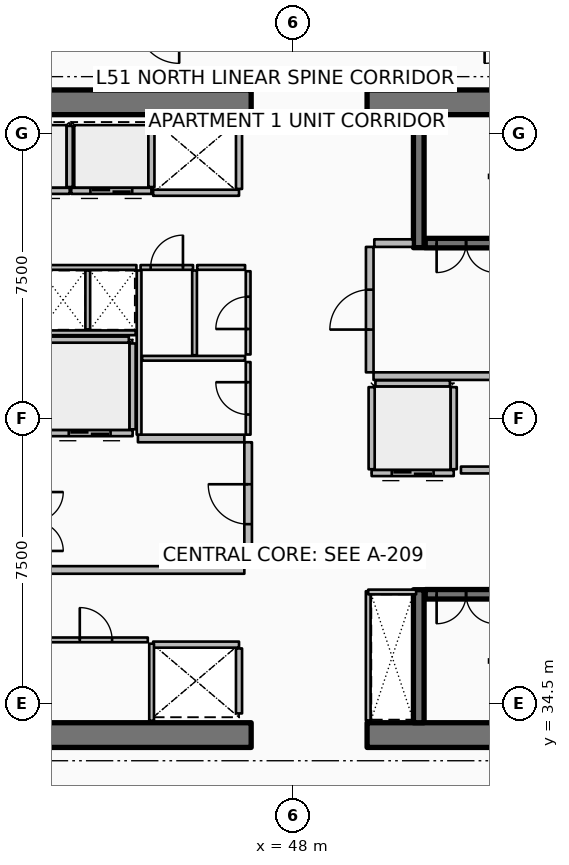
"""IFC4 building model, lengths in metres.
Left out: names, types, materials, properties, quantities, classifications, styles, units other than length and angle.
Written with IfcOpenShell. Run it as: python <this file> out.ifc"""

import sys

from ifc_helpers import new_model, si_unit, direction, frame, frame_2d, origin, place, context, subcontext, project, spatial, rectangle, extrude, element, fill, save


model = new_model("IFC4")
c1 = context("Model", 3, precision=1e-05, world=origin(), true_north=direction((0.0, 1.0)))
c2 = subcontext(c1, "Body", "Model", "MODEL_VIEW")
j1 = project(units=[si_unit("LENGTHUNIT", "METRE"), si_unit("PLANEANGLEUNIT", "RADIAN")], contexts=[c1])
p1 = place(None, origin())
s1 = spatial("IfcSite", under=j1, at=p1, CompositionType="ELEMENT")
p2 = place(p1, origin())
s2 = spatial("IfcBuilding", under=s1, at=p2, CompositionType="ELEMENT")
p3 = place(p2, frame((0.0, 0.0, 202.8)))
s3 = spatial("IfcBuildingStorey", under=s2, at=p3, CompositionType="ELEMENT", Elevation=202.8)
for number, where, z_axis, x_axis in (
    (1, (37.15, 33.675, 0.0), (0.0, 0.0, 1.0), (1.0, 0.0, 0.0)),
    (2, (49.95, 33.675, 0.0), (0.0, 0.0, 1.0), (1.0, 0.0, 0.0)),
    (3, (37.15, 50.325, 0.0), (0.0, 0.0, 1.0), (1.0, 0.0, 0.0)),
    (4, (49.95, 50.325, 0.0), (0.0, 0.0, 1.0), (1.0, 0.0, 0.0)),
):
    element("IfcWall", number, at=place(p3, frame(where, z_axis=z_axis, x_axis=x_axis)), inside=s3, PredefinedType="SHEAR", context=c2, shape_type="SweptSolid", body=[
        extrude(rectangle(XDim=9.75, YDim=0.65, at=frame_2d((4.875, 0.0))), origin(), (0.0, 0.0, 1.0), 3.75),
    ])
for number, where, z_axis, x_axis in (
    (5, (51.31, 46.5, 0.0), (0.0, 0.0, 1.0), (0.0, 1.0, 0.0)),
    (6, (51.31, 34.0, 0.0), (0.0, 0.0, 1.0), (0.0, 1.0, 0.0)),
):
    element("IfcWall", number, at=place(p3, frame(where, z_axis=z_axis, x_axis=x_axis)), inside=s3, PredefinedType="SHEAR", context=c2, shape_type="SweptSolid", body=[
        extrude(rectangle(XDim=3.5, YDim=0.28, at=frame_2d((1.75, 0.0))), origin(), (0.0, 0.0, 1.0), 3.75),
    ])
p4 = place(p3, frame((51.48, 46.62, 0.0), z_axis=(0.0, 0.0, 1.0), x_axis=(1.0, 0.0, 0.0)))
e7 = element("IfcWall", 7, at=p4, inside=s3, PredefinedType="SOLIDWALL", context=c2, shape_type="SweptSolid", body=[
    extrude(rectangle(XDim=7.54, YDim=0.25, at=frame_2d((3.77, 0.0))), origin(), (0.0, 0.0, 1.0), 3.5),
])
p5 = place(p4, frame((0.3, 0.0, 0.0)))
e8 = element("IfcOpeningElement", 8, at=p5, cuts=e7, PredefinedType="OPENING", context=c2, shape_type="SweptSolid", body=[
    extrude(rectangle(XDim=1.55, YDim=2.15, at=frame_2d((0.775, 1.075))), frame((0.0, 0.135, 0.0), z_axis=(0.0, -1.0, 0.0), x_axis=(1.0, 0.0, 0.0)), (0.0, 0.0, 1.0), 0.27),
])
p6 = place(p3, frame((51.48, 37.38, 0.0), z_axis=(0.0, 0.0, 1.0), x_axis=(1.0, 0.0, 0.0)))
e9 = element("IfcWall", 9, at=p6, inside=s3, PredefinedType="SOLIDWALL", context=c2, shape_type="SweptSolid", body=[
    extrude(rectangle(XDim=7.54, YDim=0.25, at=frame_2d((3.77, 0.0))), origin(), (0.0, 0.0, 1.0), 3.5),
])
p7 = place(p6, frame((0.3, 0.0, 0.0)))
e10 = element("IfcOpeningElement", 10, at=p7, cuts=e9, PredefinedType="OPENING", context=c2, shape_type="SweptSolid", body=[
    extrude(rectangle(XDim=1.55, YDim=2.15, at=frame_2d((0.775, 1.075))), frame((0.0, 0.135, 0.0), z_axis=(0.0, -1.0, 0.0), x_axis=(1.0, 0.0, 0.0)), (0.0, 0.0, 1.0), 0.27),
])
p8 = place(p3, frame((42.125, 47.995, 0.0), z_axis=(0.0, 0.0, 1.0), x_axis=(-1.0, 0.0, 0.0)))
e11 = element("IfcWall", 11, at=p8, inside=s3, PredefinedType="PARTITIONING", context=c2, shape_type="SweptSolid", body=[
    extrude(rectangle(XDim=2.11, YDim=0.16, at=frame_2d((1.055, 0.0))), origin(), (0.0, 0.0, 1.0), 3.5),
])
p9 = place(p8, frame((0.505, 0.0, 0.0)))
e12 = element("IfcOpeningElement", 12, at=p9, cuts=e11, PredefinedType="OPENING", context=c2, shape_type="SweptSolid", body=[
    extrude(rectangle(XDim=1.1, YDim=2.1, at=frame_2d((0.55, 1.05))), frame((0.0, 0.09, 0.0), z_axis=(0.0, -1.0, 0.0), x_axis=(1.0, 0.0, 0.0)), (0.0, 0.0, 1.0), 0.18),
])
p10 = place(p3, frame((42.125, 48.095, 0.0), z_axis=(0.0, 0.0, 1.0), x_axis=(0.0, 1.0, 0.0)))
e13 = element("IfcWall", 13, at=p10, inside=s3, PredefinedType="PARTITIONING", context=c2, shape_type="SweptSolid", body=[
    extrude(rectangle(XDim=1.61, YDim=0.16, at=frame_2d((0.805, 0.0))), origin(), (0.0, 0.0, 1.0), 3.5),
])
p11 = place(p3, frame((44.275, 47.995, 0.0), z_axis=(0.0, 0.0, 1.0), x_axis=(-1.0, 0.0, 0.0)))
e14 = element("IfcWall", 14, at=p11, inside=s3, PredefinedType="PARTITIONING", context=c2, shape_type="SweptSolid", body=[
    extrude(rectangle(XDim=2.11, YDim=0.16, at=frame_2d((1.055, 0.0))), origin(), (0.0, 0.0, 1.0), 3.5),
])
p12 = place(p11, frame((0.505, 0.0, 0.0)))
e15 = element("IfcOpeningElement", 15, at=p12, cuts=e14, PredefinedType="OPENING", context=c2, shape_type="SweptSolid", body=[
    extrude(rectangle(XDim=1.1, YDim=2.1, at=frame_2d((0.55, 1.05))), frame((0.0, 0.09, 0.0), z_axis=(0.0, -1.0, 0.0), x_axis=(1.0, 0.0, 0.0)), (0.0, 0.0, 1.0), 0.18),
])
p13 = place(p3, frame((44.275, 48.095, 0.0), z_axis=(0.0, 0.0, 1.0), x_axis=(0.0, 1.0, 0.0)))
e16 = element("IfcWall", 16, at=p13, inside=s3, PredefinedType="PARTITIONING", context=c2, shape_type="SweptSolid", body=[
    extrude(rectangle(XDim=1.61, YDim=0.16, at=frame_2d((0.805, 0.0))), origin(), (0.0, 0.0, 1.0), 3.5),
])
p14 = place(p3, frame((46.58, 47.945, 0.0), z_axis=(0.0, 0.0, 1.0), x_axis=(-1.0, 0.0, 0.0)))
e17 = element("IfcWall", 17, at=p14, inside=s3, PredefinedType="PARTITIONING", context=c2, shape_type="SweptSolid", body=[
    extrude(rectangle(XDim=2.26, YDim=0.16, at=frame_2d((1.13, 0.0))), origin(), (0.0, 0.0, 1.0), 3.5),
])
p15 = place(p3, frame((46.58, 48.045, 0.0), z_axis=(0.0, 0.0, 1.0), x_axis=(0.0, 1.0, 0.0)))
e18 = element("IfcWall", 18, at=p15, inside=s3, PredefinedType="PARTITIONING", context=c2, shape_type="SweptSolid", body=[
    extrude(rectangle(XDim=1.71, YDim=0.16, at=frame_2d((0.855, 0.0))), origin(), (0.0, 0.0, 1.0), 3.5),
])
p16 = place(p3, frame((44.32, 36.055, 0.0), z_axis=(0.0, 0.0, 1.0), x_axis=(1.0, 0.0, 0.0)))
e19 = element("IfcWall", 19, at=p16, inside=s3, PredefinedType="PARTITIONING", context=c2, shape_type="SweptSolid", body=[
    extrude(rectangle(XDim=2.26, YDim=0.16, at=frame_2d((1.13, 0.0))), origin(), (0.0, 0.0, 1.0), 3.5),
])
p17 = place(p3, frame((46.58, 34.245, 0.0), z_axis=(0.0, 0.0, 1.0), x_axis=(0.0, 1.0, 0.0)))
e20 = element("IfcWall", 20, at=p17, inside=s3, PredefinedType="PARTITIONING", context=c2, shape_type="SweptSolid", body=[
    extrude(rectangle(XDim=1.71, YDim=0.16, at=frame_2d((0.855, 0.0))), origin(), (0.0, 0.0, 1.0), 3.5),
])
p18 = place(p3, frame((43.78, 41.62, 0.0), z_axis=(0.0, 0.0, 1.0), x_axis=(-1.0, 0.0, 0.0)))
e21 = element("IfcWall", 21, at=p18, inside=s3, PredefinedType="PARTITIONING", context=c2, shape_type="SweptSolid", body=[
    extrude(rectangle(XDim=2.26, YDim=0.16, at=frame_2d((1.13, 0.0))), origin(), (0.0, 0.0, 1.0), 3.5),
])
p19 = place(p18, frame((0.58, 0.0, 0.0)))
e22 = element("IfcOpeningElement", 22, at=p19, cuts=e21, PredefinedType="OPENING", context=c2, shape_type="SweptSolid", body=[
    extrude(rectangle(XDim=1.1, YDim=2.1, at=frame_2d((0.55, 1.05))), frame((0.0, 0.09, 0.0), z_axis=(0.0, -1.0, 0.0), x_axis=(1.0, 0.0, 0.0)), (0.0, 0.0, 1.0), 0.18),
])
p20 = place(p3, frame((43.78, 41.72, 0.0), z_axis=(0.0, 0.0, 1.0), x_axis=(0.0, 1.0, 0.0)))
e23 = element("IfcWall", 23, at=p20, inside=s3, PredefinedType="PARTITIONING", context=c2, shape_type="SweptSolid", body=[
    extrude(rectangle(XDim=2.26, YDim=0.16, at=frame_2d((1.13, 0.0))), origin(), (0.0, 0.0, 1.0), 3.5),
])
p21 = place(p3, frame((41.62, 44.08, 0.0), z_axis=(0.0, 0.0, 1.0), x_axis=(1.0, 0.0, 0.0)))
e24 = element("IfcWall", 24, at=p21, inside=s3, PredefinedType="PARTITIONING", context=c2, shape_type="SweptSolid", body=[
    extrude(rectangle(XDim=2.06, YDim=0.16, at=frame_2d((1.03, 0.0))), origin(), (0.0, 0.0, 1.0), 3.5),
])
p22 = place(p3, frame((52.23, 40.57, 0.0), z_axis=(0.0, 0.0, 1.0), x_axis=(-1.0, 0.0, 0.0)))
e25 = element("IfcWall", 25, at=p22, inside=s3, PredefinedType="PARTITIONING", context=c2, shape_type="SweptSolid", body=[
    extrude(rectangle(XDim=2.16, YDim=0.16, at=frame_2d((1.08, 0.0))), origin(), (0.0, 0.0, 1.0), 3.5),
])
p23 = place(p22, frame((0.53, 0.0, 0.0)))
e26 = element("IfcOpeningElement", 26, at=p23, cuts=e25, PredefinedType="OPENING", context=c2, shape_type="SweptSolid", body=[
    extrude(rectangle(XDim=1.1, YDim=2.1, at=frame_2d((0.55, 1.05))), frame((0.0, 0.09, 0.0), z_axis=(0.0, -1.0, 0.0), x_axis=(1.0, 0.0, 0.0)), (0.0, 0.0, 1.0), 0.18),
])
for number, where, z_axis, x_axis in (
    (27, (52.23, 40.67, 0.0), (0.0, 0.0, 1.0), (0.0, 1.0, 0.0)),
    (28, (50.07, 40.67, 0.0), (0.0, 0.0, 1.0), (0.0, 1.0, 0.0)),
):
    element("IfcWall", number, at=place(p3, frame(where, z_axis=z_axis, x_axis=x_axis)), inside=s3, PredefinedType="PARTITIONING", context=c2, shape_type="SweptSolid", body=[
        extrude(rectangle(XDim=2.16, YDim=0.16, at=frame_2d((1.08, 0.0))), origin(), (0.0, 0.0, 1.0), 3.5),
    ])
p24 = place(p3, frame((50.17, 42.93, 0.0), z_axis=(0.0, 0.0, 1.0), x_axis=(1.0, 0.0, 0.0)))
e29 = element("IfcWall", 29, at=p24, inside=s3, PredefinedType="PARTITIONING", context=c2, shape_type="SweptSolid", body=[
    extrude(rectangle(XDim=1.96, YDim=0.16, at=frame_2d((0.98, 0.0))), origin(), (0.0, 0.0, 1.0), 3.5),
])
p25 = place(p3, frame((52.42, 40.65, 0.0), z_axis=(0.0, 0.0, 1.0), x_axis=(1.0, 0.0, 0.0)))
e30 = element("IfcWall", 30, at=p25, inside=s3, PredefinedType="PARTITIONING", context=c2, shape_type="SweptSolid", body=[
    extrude(rectangle(XDim=6.5, YDim=0.18, at=frame_2d((3.25, 0.0))), origin(), (0.0, 0.0, 1.0), 3.5),
])
p26 = place(p25, frame((2.825, 0.0, 0.0)))
e31 = element("IfcOpeningElement", 31, at=p26, cuts=e30, PredefinedType="OPENING", context=c2, shape_type="SweptSolid", body=[
    extrude(rectangle(XDim=0.85, YDim=2.06, at=frame_2d((0.425, 1.03))), frame((0.0, 0.1, 0.0), z_axis=(0.0, -1.0, 0.0), x_axis=(1.0, 0.0, 0.0)), (0.0, 0.0, 1.0), 0.2),
])
p27 = place(p3, frame((44.28, 34.05, 0.0), z_axis=(0.0, 0.0, 1.0), x_axis=(0.0, 1.0, 0.0)))
e32 = element("IfcWall", 32, at=p27, inside=s3, PredefinedType="PARTITIONING", context=c2, shape_type="SweptSolid", body=[
    extrude(rectangle(XDim=2.03, YDim=0.125, at=frame_2d((1.015, 0.0))), origin(), (0.0, 0.0, 1.0), 2.94),
])
p28 = place(p3, frame((41.45, 36.18, 0.0), z_axis=(0.0, 0.0, 1.0), x_axis=(1.0, 0.0, 0.0)))
e33 = element("IfcWall", 33, at=p28, inside=s3, PredefinedType="PARTITIONING", context=c2, shape_type="SweptSolid", body=[
    extrude(rectangle(XDim=2.73, YDim=0.125, at=frame_2d((1.365, 0.0))), origin(), (0.0, 0.0, 1.0), 2.94),
])
p29 = place(p28, frame((0.94, 0.0, 0.0)))
e34 = element("IfcOpeningElement", 34, at=p29, cuts=e33, PredefinedType="OPENING", context=c2, shape_type="SweptSolid", body=[
    extrude(rectangle(XDim=0.85, YDim=2.06, at=frame_2d((0.425, 1.03))), frame((0.0, 0.073, 0.0), z_axis=(0.0, -1.0, 0.0), x_axis=(1.0, 0.0, 0.0)), (0.0, 0.0, 1.0), 0.145),
])
p30 = place(p3, frame((41.35, 38.02, 0.0), z_axis=(0.0, 0.0, 1.0), x_axis=(1.0, 0.0, 0.0)))
e35 = element("IfcWall", 35, at=p30, inside=s3, PredefinedType="PARTITIONING", context=c2, shape_type="SweptSolid", body=[
    extrude(rectangle(XDim=5.37, YDim=0.2, at=frame_2d((2.685, 0.0))), origin(), (0.0, 0.0, 1.0), 3.5),
])
p31 = place(p3, frame((43.92, 41.48, 0.0), z_axis=(0.0, 0.0, 1.0), x_axis=(1.0, 0.0, 0.0)))
e36 = element("IfcWall", 36, at=p31, inside=s3, PredefinedType="PARTITIONING", context=c2, shape_type="SweptSolid", body=[
    extrude(rectangle(XDim=2.8, YDim=0.2, at=frame_2d((1.4, 0.0))), origin(), (0.0, 0.0, 1.0), 3.5),
])
p32 = place(p3, frame((46.82, 38.12, 0.0), z_axis=(0.0, 0.0, 1.0), x_axis=(0.0, 1.0, 0.0)))
e37 = element("IfcWall", 37, at=p32, inside=s3, PredefinedType="PARTITIONING", context=c2, shape_type="SweptSolid", body=[
    extrude(rectangle(XDim=3.26, YDim=0.2, at=frame_2d((1.63, 0.0))), origin(), (0.0, 0.0, 1.0), 3.5),
])
p33 = place(p32, frame((1.105, 0.0, 0.0)))
e38 = element("IfcOpeningElement", 38, at=p33, cuts=e37, PredefinedType="OPENING", context=c2, shape_type="SweptSolid", body=[
    extrude(rectangle(XDim=1.05, YDim=2.1, at=frame_2d((0.525, 1.05))), frame((0.0, 0.11, 0.0), z_axis=(0.0, -1.0, 0.0), x_axis=(1.0, 0.0, 0.0)), (0.0, 0.0, 1.0), 0.22),
])
p34 = place(p3, frame((50.12, 43.12, 0.0), z_axis=(0.0, 0.0, 1.0), x_axis=(1.0, 0.0, 0.0)))
e39 = element("IfcWall", 39, at=p34, inside=s3, PredefinedType="PARTITIONING", context=c2, shape_type="SweptSolid", body=[
    extrude(rectangle(XDim=8.88, YDim=0.2, at=frame_2d((4.44, 0.0))), origin(), (0.0, 0.0, 1.0), 3.5),
])
p35 = place(p3, frame((50.14, 46.62, 0.0), z_axis=(0.0, 0.0, 1.0), x_axis=(1.0, 0.0, 0.0)))
e40 = element("IfcWall", 40, at=p35, inside=s3, PredefinedType="PARTITIONING", context=c2, shape_type="SweptSolid", body=[
    extrude(rectangle(XDim=1.02, YDim=0.2, at=frame_2d((0.51, 0.0))), origin(), (0.0, 0.0, 1.0), 3.5),
])
p36 = place(p3, frame((50.02, 43.22, 0.0), z_axis=(0.0, 0.0, 1.0), x_axis=(0.0, 1.0, 0.0)))
e41 = element("IfcWall", 41, at=p36, inside=s3, PredefinedType="PARTITIONING", context=c2, shape_type="SweptSolid", body=[
    extrude(rectangle(XDim=3.3, YDim=0.2, at=frame_2d((1.65, 0.0))), origin(), (0.0, 0.0, 1.0), 3.5),
])
p37 = place(p36, frame((1.125, 0.0, 0.0)))
e42 = element("IfcOpeningElement", 42, at=p37, cuts=e41, PredefinedType="OPENING", context=c2, shape_type="SweptSolid", body=[
    extrude(rectangle(XDim=1.05, YDim=2.1, at=frame_2d((0.525, 1.05))), frame((0.0, 0.11, 0.0), z_axis=(0.0, -1.0, 0.0), x_axis=(1.0, 0.0, 0.0)), (0.0, 0.0, 1.0), 0.22),
])
p38 = place(p3, frame((41.36, 44.26, 0.0), z_axis=(0.0, 0.0, 1.0), x_axis=(1.0, 0.0, 0.0)))
e43 = element("IfcWall", 43, at=p38, inside=s3, PredefinedType="PARTITIONING", context=c2, shape_type="SweptSolid", body=[
    extrude(rectangle(XDim=2.5, YDim=0.125, at=frame_2d((1.25, 0.0))), origin(), (0.0, 0.0, 1.0), 2.94),
])
p39 = place(p3, frame((42.6, 44.35, 0.0), z_axis=(0.0, 0.0, 1.0), x_axis=(0.0, 1.0, 0.0)))
e44 = element("IfcWall", 44, at=p39, inside=s3, PredefinedType="PARTITIONING", context=c2, shape_type="SweptSolid", body=[
    extrude(rectangle(XDim=1.55, YDim=0.125, at=frame_2d((0.775, 0.0))), origin(), (0.0, 0.0, 1.0), 2.94),
])
p40 = place(p3, frame((49.98, 34.06, 0.0), z_axis=(0.0, 0.0, 1.0), x_axis=(0.0, 1.0, 0.0)))
e45 = element("IfcWall", 45, at=p40, inside=s3, PredefinedType="PARTITIONING", context=c2, shape_type="SweptSolid", body=[
    extrude(rectangle(XDim=3.4, YDim=0.125, at=frame_2d((1.7, 0.0))), origin(), (0.0, 0.0, 1.0), 2.94),
])
p41 = place(p3, frame((49.98, 37.44, 0.0), z_axis=(0.0, 0.0, 1.0), x_axis=(1.0, 0.0, 0.0)))
e46 = element("IfcWall", 46, at=p41, inside=s3, PredefinedType="PARTITIONING", context=c2, shape_type="SweptSolid", body=[
    extrude(rectangle(XDim=1.26, YDim=0.125, at=frame_2d((0.63, 0.0))), origin(), (0.0, 0.0, 1.0), 2.94),
])
p42 = place(p3, frame((43.95, 41.58, 0.0), z_axis=(0.0, 0.0, 1.0), x_axis=(0.0, 1.0, 0.0)))
e47 = element("IfcWall", 47, at=p42, inside=s3, PredefinedType="PARTITIONING", context=c2, shape_type="SweptSolid", body=[
    extrude(rectangle(XDim=4.32, YDim=0.125, at=frame_2d((2.16, 0.0))), origin(), (0.0, 0.0, 1.0), 2.94),
])
p43 = place(p3, frame((44.03, 43.59, 0.0), z_axis=(0.0, 0.0, 1.0), x_axis=(1.0, 0.0, 0.0)))
e48 = element("IfcWall", 48, at=p43, inside=s3, PredefinedType="PARTITIONING", context=c2, shape_type="SweptSolid", body=[
    extrude(rectangle(XDim=2.71, YDim=0.125, at=frame_2d((1.355, 0.0))), origin(), (0.0, 0.0, 1.0), 2.94),
])
p44 = place(p3, frame((45.41, 43.67, 0.0), z_axis=(0.0, 0.0, 1.0), x_axis=(0.0, 1.0, 0.0)))
e49 = element("IfcWall", 49, at=p44, inside=s3, PredefinedType="PARTITIONING", context=c2, shape_type="SweptSolid", body=[
    extrude(rectangle(XDim=2.23, YDim=0.125, at=frame_2d((1.115, 0.0))), origin(), (0.0, 0.0, 1.0), 2.94),
])
p45 = place(p3, frame((46.82, 41.58, 0.0), z_axis=(0.0, 0.0, 1.0), x_axis=(0.0, 1.0, 0.0)))
e50 = element("IfcWall", 50, at=p45, inside=s3, PredefinedType="PARTITIONING", context=c2, shape_type="SweptSolid", body=[
    extrude(rectangle(XDim=1.91, YDim=0.125, at=frame_2d((0.955, 0.0))), origin(), (0.0, 0.0, 1.0), 2.94),
])
p46 = place(p45, frame((0.53, 0.0, 0.0)))
e51 = element("IfcOpeningElement", 51, at=p46, cuts=e50, PredefinedType="OPENING", context=c2, shape_type="SweptSolid", body=[
    extrude(rectangle(XDim=0.85, YDim=2.06, at=frame_2d((0.425, 1.03))), frame((0.0, 0.073, 0.0), z_axis=(0.0, -1.0, 0.0), x_axis=(1.0, 0.0, 0.0)), (0.0, 0.0, 1.0), 0.145),
])
p47 = place(p3, frame((46.82, 43.69, 0.0), z_axis=(0.0, 0.0, 1.0), x_axis=(0.0, 1.0, 0.0)))
e52 = element("IfcWall", 52, at=p47, inside=s3, PredefinedType="PARTITIONING", context=c2, shape_type="SweptSolid", body=[
    extrude(rectangle(XDim=2.19, YDim=0.125, at=frame_2d((1.095, 0.0))), origin(), (0.0, 0.0, 1.0), 2.94),
])
p48 = place(p47, frame((0.67, 0.0, 0.0)))
e53 = element("IfcOpeningElement", 53, at=p48, cuts=e52, PredefinedType="OPENING", context=c2, shape_type="SweptSolid", body=[
    extrude(rectangle(XDim=0.85, YDim=2.06, at=frame_2d((0.425, 1.03))), frame((0.0, 0.073, 0.0), z_axis=(0.0, -1.0, 0.0), x_axis=(1.0, 0.0, 0.0)), (0.0, 0.0, 1.0), 0.145),
])
p49 = place(p3, frame((41.35, 45.98, 0.0), z_axis=(0.0, 0.0, 1.0), x_axis=(1.0, 0.0, 0.0)))
e54 = element("IfcWall", 54, at=p49, inside=s3, PredefinedType="PARTITIONING", context=c2, shape_type="SweptSolid", body=[
    extrude(rectangle(XDim=2.53, YDim=0.125, at=frame_2d((1.265, 0.0))), origin(), (0.0, 0.0, 1.0), 2.94),
])
p50 = place(p3, frame((43.99, 45.98, 0.0), z_axis=(0.0, 0.0, 1.0), x_axis=(1.0, 0.0, 0.0)))
e55 = element("IfcWall", 55, at=p50, inside=s3, PredefinedType="PARTITIONING", context=c2, shape_type="SweptSolid", body=[
    extrude(rectangle(XDim=1.38, YDim=0.125, at=frame_2d((0.69, 0.0))), origin(), (0.0, 0.0, 1.0), 2.94),
])
p51 = place(p50, frame((0.265, 0.0, 0.0)))
e56 = element("IfcOpeningElement", 56, at=p51, cuts=e55, PredefinedType="OPENING", context=c2, shape_type="SweptSolid", body=[
    extrude(rectangle(XDim=0.85, YDim=2.06, at=frame_2d((0.425, 1.03))), frame((0.0, 0.073, 0.0), z_axis=(0.0, -1.0, 0.0), x_axis=(1.0, 0.0, 0.0)), (0.0, 0.0, 1.0), 0.145),
])
p52 = place(p3, frame((45.48, 45.98, 0.0), z_axis=(0.0, 0.0, 1.0), x_axis=(1.0, 0.0, 0.0)))
e57 = element("IfcWall", 57, at=p52, inside=s3, PredefinedType="PARTITIONING", context=c2, shape_type="SweptSolid", body=[
    extrude(rectangle(XDim=1.26, YDim=0.125, at=frame_2d((0.63, 0.0))), origin(), (0.0, 0.0, 1.0), 2.94),
])
p53 = place(p5, origin())
e58 = element("IfcDoor", 58, at=p53, inside=s3, OperationType="DOUBLE_DOOR_SINGLE_SWING", PredefinedType="DOOR", context=c2, shape_type="SweptSolid", body=[
    extrude(rectangle(XDim=1.55, YDim=2.15, at=frame_2d((0.775, 1.075))), frame((0.0, 0.025, 0.0), z_axis=(0.0, -1.0, 0.0), x_axis=(1.0, 0.0, 0.0)), (0.0, 0.0, 1.0), 0.05),
])
fill(e8, e58)
p54 = place(p7, origin())
e59 = element("IfcDoor", 59, at=p54, inside=s3, OperationType="DOUBLE_DOOR_SINGLE_SWING", PredefinedType="DOOR", context=c2, shape_type="SweptSolid", body=[
    extrude(rectangle(XDim=1.55, YDim=2.15, at=frame_2d((0.775, 1.075))), frame((0.0, 0.025, 0.0), z_axis=(0.0, -1.0, 0.0), x_axis=(1.0, 0.0, 0.0)), (0.0, 0.0, 1.0), 0.05),
])
fill(e10, e59)
p55 = place(p12, origin())
e60 = element("IfcDoor", 60, at=p55, inside=s3, OperationType="DOUBLE_DOOR_SLIDING", PredefinedType="DOOR", context=c2, shape_type="SweptSolid", body=[
    extrude(rectangle(XDim=1.1, YDim=2.1, at=frame_2d((0.55, 1.05))), frame((0.0, 0.025, 0.0), z_axis=(0.0, -1.0, 0.0), x_axis=(1.0, 0.0, 0.0)), (0.0, 0.0, 1.0), 0.05),
])
fill(e15, e60)
p56 = place(p19, origin())
e61 = element("IfcDoor", 61, at=p56, inside=s3, OperationType="DOUBLE_DOOR_SLIDING", PredefinedType="DOOR", context=c2, shape_type="SweptSolid", body=[
    extrude(rectangle(XDim=1.1, YDim=2.1, at=frame_2d((0.55, 1.05))), frame((0.0, 0.025, 0.0), z_axis=(0.0, -1.0, 0.0), x_axis=(1.0, 0.0, 0.0)), (0.0, 0.0, 1.0), 0.05),
])
fill(e22, e61)
p57 = place(p23, origin())
e62 = element("IfcDoor", 62, at=p57, inside=s3, OperationType="DOUBLE_DOOR_SLIDING", PredefinedType="DOOR", context=c2, shape_type="SweptSolid", body=[
    extrude(rectangle(XDim=1.1, YDim=2.1, at=frame_2d((0.55, 1.05))), frame((0.0, 0.025, 0.0), z_axis=(0.0, -1.0, 0.0), x_axis=(1.0, 0.0, 0.0)), (0.0, 0.0, 1.0), 0.05),
])
fill(e26, e62)
p58 = place(p29, origin())
e63 = element("IfcDoor", 63, at=p58, inside=s3, OperationType="SINGLE_SWING_LEFT", PredefinedType="DOOR", context=c2, shape_type="SweptSolid", body=[
    extrude(rectangle(XDim=0.85, YDim=2.06, at=frame_2d((0.425, 1.03))), frame((0.0, 0.025, 0.0), z_axis=(0.0, -1.0, 0.0), x_axis=(1.0, 0.0, 0.0)), (0.0, 0.0, 1.0), 0.05),
])
fill(e34, e63)
p59 = place(p33, origin())
e64 = element("IfcDoor", 64, at=p59, inside=s3, OperationType="SINGLE_SWING_RIGHT", PredefinedType="DOOR", context=c2, shape_type="SweptSolid", body=[
    extrude(rectangle(XDim=1.05, YDim=2.1, at=frame_2d((0.525, 1.05))), frame((0.0, 0.025, 0.0), z_axis=(0.0, -1.0, 0.0), x_axis=(1.0, 0.0, 0.0)), (0.0, 0.0, 1.0), 0.05),
])
fill(e38, e64)
p60 = place(p37, origin())
e65 = element("IfcDoor", 65, at=p60, inside=s3, OperationType="SINGLE_SWING_LEFT", PredefinedType="DOOR", context=c2, shape_type="SweptSolid", body=[
    extrude(rectangle(XDim=1.05, YDim=2.1, at=frame_2d((0.525, 1.05))), frame((0.0, 0.025, 0.0), z_axis=(0.0, -1.0, 0.0), x_axis=(1.0, 0.0, 0.0)), (0.0, 0.0, 1.0), 0.05),
])
fill(e42, e65)
p61 = place(p46, origin())
e66 = element("IfcDoor", 66, at=p61, inside=s3, OperationType="SINGLE_SWING_RIGHT", PredefinedType="DOOR", context=c2, shape_type="SweptSolid", body=[
    extrude(rectangle(XDim=0.85, YDim=2.06, at=frame_2d((0.425, 1.03))), frame((0.0, 0.025, 0.0), z_axis=(0.0, -1.0, 0.0), x_axis=(1.0, 0.0, 0.0)), (0.0, 0.0, 1.0), 0.05),
])
fill(e51, e66)
p62 = place(p48, origin())
e67 = element("IfcDoor", 67, at=p62, inside=s3, OperationType="SINGLE_SWING_LEFT", PredefinedType="DOOR", context=c2, shape_type="SweptSolid", body=[
    extrude(rectangle(XDim=0.85, YDim=2.06, at=frame_2d((0.425, 1.03))), frame((0.0, 0.025, 0.0), z_axis=(0.0, -1.0, 0.0), x_axis=(1.0, 0.0, 0.0)), (0.0, 0.0, 1.0), 0.05),
])
fill(e53, e67)
p63 = place(p51, origin())
e68 = element("IfcDoor", 68, at=p63, inside=s3, OperationType="SINGLE_SWING_RIGHT", PredefinedType="DOOR", context=c2, shape_type="SweptSolid", body=[
    extrude(rectangle(XDim=0.85, YDim=2.06, at=frame_2d((0.425, 1.03))), frame((0.0, 0.025, 0.0), z_axis=(0.0, -1.0, 0.0), x_axis=(1.0, 0.0, 0.0)), (0.0, 0.0, 1.0), 0.05),
])
fill(e56, e68)
save(model, sys.argv[1])
